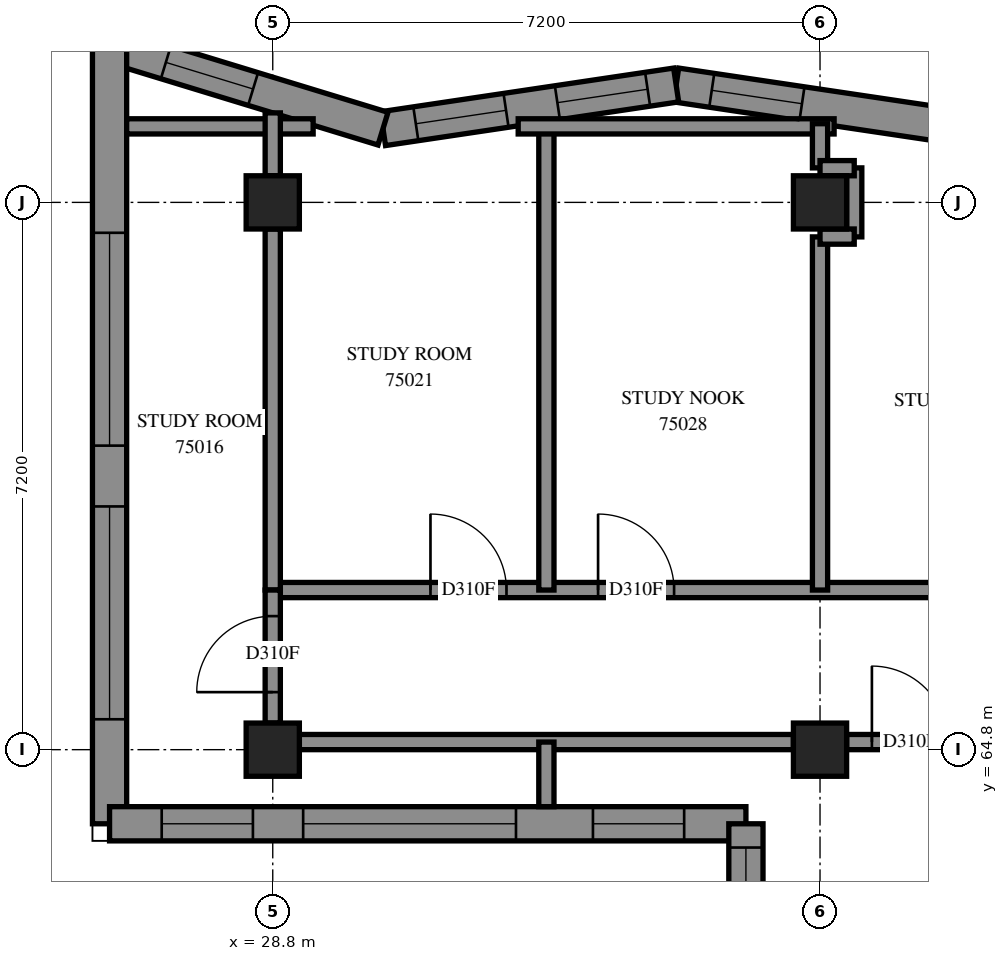
"""IFC4 building model, lengths in metres.
Left out: names, types, materials, properties, quantities, classifications, styles, units other than length and angle.
Written with IfcOpenShell. Run it as: python <this file> out.ifc"""

import sys

from ifc_helpers import new_model, si_unit, direction, frame, frame_2d, origin, origin_2d, place, context, subcontext, project, spatial, polyline, rectangle, outline, extrude, element, fill, save


model = new_model("IFC4")
c1 = context("Model", 3, precision=1e-05, world=origin(), true_north=direction((0.0, 1.0)))
c2 = subcontext(c1, "Body", "Model", "MODEL_VIEW")
j1 = project(units=[si_unit("LENGTHUNIT", "METRE"), si_unit("PLANEANGLEUNIT", "RADIAN")], contexts=[c1])
p1 = place(None, origin())
s1 = spatial("IfcSite", under=j1, at=p1, CompositionType="ELEMENT")
p2 = place(p1, origin())
s2 = spatial("IfcBuilding", under=s1, at=p2, CompositionType="ELEMENT")
p3 = place(p2, frame((0.0, 0.0, 274.4)))
s3 = spatial("IfcBuildingStorey", under=s2, at=p3, CompositionType="ELEMENT", Elevation=274.4)
for number, where, z_axis, x_axis in (
    (1, (28.8, 64.8, 0.0), (0.0, 0.0, 1.0), (1.0, 0.0, 0.0)),
    (2, (28.8, 72.0, 0.0), (0.0, 0.0, 1.0), (1.0, 0.0, 0.0)),
    (3, (36.0, 64.8, 0.0), (0.0, 0.0, 1.0), (1.0, 0.0, 0.0)),
    (4, (36.0, 72.0, 0.0), (0.0, 0.0, 1.0), (1.0, 0.0, 0.0)),
):
    element("IfcColumn", number, at=place(p3, frame(where, z_axis=z_axis, x_axis=x_axis)), inside=s3, PredefinedType="COLUMN", context=c2, shape_type="SweptSolid", body=[
        extrude(rectangle(XDim=0.7, YDim=0.7, at=origin_2d()), origin(), (0.0, 0.0, 1.0), 3.1),
    ])
p4 = place(p3, frame((37.947, 72.972, 0.0), z_axis=(0.0, 0.0, 1.0), x_axis=(-0.9890847468, 0.1473477641, 0.0)))
e5 = element("IfcWall", 5, at=p4, inside=s3, PredefinedType="SOLIDWALL", context=c2, shape_type="SweptSolid", body=[
    extrude(outline(polyline([(0.034, -0.225), (3.916, -0.225), (3.849, 0.225), (-0.034, 0.225), (0.034, -0.225)])), origin(), (0.0, 0.0, 1.0), 3.1),
])
p5 = place(p4, frame((2.208, 0.0, 0.45)))
e6 = element("IfcOpeningElement", 6, at=p5, cuts=e5, PredefinedType="OPENING", context=c2, shape_type="SweptSolid", body=[
    extrude(rectangle(XDim=1.2, YDim=2.55, at=frame_2d((0.6, 1.275))), frame((0.0, 0.235, 0.0), z_axis=(0.0, -1.0, 0.0), x_axis=(1.0, 0.0, 0.0)), (0.0, 0.0, 1.0), 0.47),
])
p6 = place(p3, frame((34.107, 73.544, 0.0), z_axis=(0.0, 0.0, 1.0), x_axis=(-0.9890865204, -0.1473358586, 0.0)))
e7 = element("IfcWall", 7, at=p6, inside=s3, PredefinedType="SOLIDWALL", context=c2, shape_type="SweptSolid", body=[
    extrude(outline(polyline([(-0.034, -0.225), (3.849, -0.225), (3.95, 0.225), (0.034, 0.225), (-0.034, -0.225)])), origin(), (0.0, 0.0, 1.0), 3.1),
])
p7 = place(p6, frame((0.38, 0.0, 0.45)))
e8 = element("IfcOpeningElement", 8, at=p7, cuts=e7, PredefinedType="OPENING", context=c2, shape_type="SweptSolid", body=[
    extrude(rectangle(XDim=1.2, YDim=2.55, at=frame_2d((0.6, 1.275))), frame((0.0, 0.235, 0.0), z_axis=(0.0, -1.0, 0.0), x_axis=(1.0, 0.0, 0.0)), (0.0, 0.0, 1.0), 0.47),
])
p8 = place(p6, frame((2.263, 0.0, 0.45)))
e9 = element("IfcOpeningElement", 9, at=p8, cuts=e7, PredefinedType="OPENING", context=c2, shape_type="SweptSolid", body=[
    extrude(rectangle(XDim=1.2, YDim=2.55, at=frame_2d((0.6, 1.275))), frame((0.0, 0.235, 0.0), z_axis=(0.0, -1.0, 0.0), x_axis=(1.0, 0.0, 0.0)), (0.0, 0.0, 1.0), 0.47),
])
p9 = place(p3, frame((30.25, 72.97, 0.0), z_axis=(0.0, 0.0, 1.0), x_axis=(-0.9564359426, 0.2919422678, 0.0)))
e10 = element("IfcWall", 10, at=p9, inside=s3, PredefinedType="SOLIDWALL", context=c2, shape_type="SweptSolid", body=[
    extrude(outline(polyline([(0.051, -0.225), (4.065, -0.225), (3.457, 0.225), (-0.051, 0.225), (0.051, -0.225)])), origin(), (0.0, 0.0, 1.0), 3.1),
])
p10 = place(p9, frame((1.787, 0.0, 0.45)))
e11 = element("IfcOpeningElement", 11, at=p10, cuts=e10, PredefinedType="OPENING", context=c2, shape_type="SweptSolid", body=[
    extrude(rectangle(XDim=1.2, YDim=2.55, at=frame_2d((0.6, 1.275))), frame((0.0, 0.235, 0.0), z_axis=(0.0, -1.0, 0.0), x_axis=(1.0, 0.0, 0.0)), (0.0, 0.0, 1.0), 0.47),
])
p11 = place(p3, frame((26.653, 74.068, 0.0), z_axis=(0.0, 0.0, 1.0), x_axis=(0.0, -1.0, 0.0)))
e12 = element("IfcWall", 12, at=p11, inside=s3, PredefinedType="SOLIDWALL", context=c2, shape_type="SweptSolid", body=[
    extrude(outline(polyline([(-0.304, -0.225), (10.468, -0.225), (10.018, 0.225), (0.304, 0.225), (-0.304, -0.225)])), origin(), (0.0, 0.0, 1.0), 3.1),
])
p12 = place(p11, frame((2.468, 0.0, 0.45)))
e13 = element("IfcOpeningElement", 13, at=p12, cuts=e12, PredefinedType="OPENING", context=c2, shape_type="SweptSolid", body=[
    extrude(rectangle(XDim=2.8, YDim=2.55, at=frame_2d((1.4, 1.275))), frame((0.0, 0.235, 0.0), z_axis=(0.0, -1.0, 0.0), x_axis=(1.0, 0.0, 0.0)), (0.0, 0.0, 1.0), 0.47),
])
p13 = place(p11, frame((6.068, 0.0, 0.45)))
e14 = element("IfcOpeningElement", 14, at=p13, cuts=e12, PredefinedType="OPENING", context=c2, shape_type="SweptSolid", body=[
    extrude(rectangle(XDim=2.8, YDim=2.55, at=frame_2d((1.4, 1.275))), frame((0.0, 0.235, 0.0), z_axis=(0.0, -1.0, 0.0), x_axis=(1.0, 0.0, 0.0)), (0.0, 0.0, 1.0), 0.47),
])
p14 = place(p3, frame((26.653, 63.825, 0.0), z_axis=(0.0, 0.0, 1.0), x_axis=(1.0, 0.0, 0.0)))
e15 = element("IfcWall", 15, at=p14, inside=s3, PredefinedType="SOLIDWALL", context=c2, shape_type="SweptSolid", body=[
    extrude(outline(polyline([(-0.225, -0.225), (8.147, -0.225), (8.597, 0.225), (0.225, 0.225), (-0.225, -0.225)])), origin(), (0.0, 0.0, 1.0), 3.1),
])
p15 = place(p14, frame((2.547, 0.0, 0.45)))
e16 = element("IfcOpeningElement", 16, at=p15, cuts=e15, PredefinedType="OPENING", context=c2, shape_type="SweptSolid", body=[
    extrude(rectangle(XDim=2.8, YDim=2.55, at=frame_2d((1.4, 1.275))), frame((0.0, 0.235, 0.0), z_axis=(0.0, -1.0, 0.0), x_axis=(1.0, 0.0, 0.0)), (0.0, 0.0, 1.0), 0.47),
])
p16 = place(p14, frame((0.686, 0.0, 0.45)))
e17 = element("IfcOpeningElement", 17, at=p16, cuts=e15, PredefinedType="OPENING", context=c2, shape_type="SweptSolid", body=[
    extrude(rectangle(XDim=1.2, YDim=2.55, at=frame_2d((0.6, 1.275))), frame((0.0, 0.235, 0.0), z_axis=(0.0, -1.0, 0.0), x_axis=(1.0, 0.0, 0.0)), (0.0, 0.0, 1.0), 0.47),
])
p17 = place(p14, frame((6.359, 0.0, 0.45)))
e18 = element("IfcOpeningElement", 18, at=p17, cuts=e15, PredefinedType="OPENING", context=c2, shape_type="SweptSolid", body=[
    extrude(rectangle(XDim=1.2, YDim=2.55, at=frame_2d((0.6, 1.275))), frame((0.0, 0.235, 0.0), z_axis=(0.0, -1.0, 0.0), x_axis=(1.0, 0.0, 0.0)), (0.0, 0.0, 1.0), 0.47),
])
p18 = place(p3, frame((35.025, 63.825, 0.0), z_axis=(0.0, 0.0, 1.0), x_axis=(0.0, -1.0, 0.0)))
e19 = element("IfcWall", 19, at=p18, inside=s3, PredefinedType="SOLIDWALL", context=c2, shape_type="SweptSolid", body=[
    extrude(outline(polyline([(0.225, -0.225), (7.425, -0.225), (6.975, 0.225), (-0.225, 0.225), (0.225, -0.225)])), origin(), (0.0, 0.0, 1.0), 3.1),
])
p19 = place(p18, frame((0.312, 0.0, 0.45)))
e20 = element("IfcOpeningElement", 20, at=p19, cuts=e19, PredefinedType="OPENING", context=c2, shape_type="SweptSolid", body=[
    extrude(rectangle(XDim=1.2, YDim=2.55, at=frame_2d((0.6, 1.275))), frame((0.0, 0.235, 0.0), z_axis=(0.0, -1.0, 0.0), x_axis=(1.0, 0.0, 0.0)), (0.0, 0.0, 1.0), 0.47),
])
p20 = place(p18, frame((3.875, 0.0, 0.7)))
e21 = element("IfcOpeningElement", 21, at=p20, cuts=e19, PredefinedType="OPENING", context=c2, shape_type="SweptSolid", body=[
    extrude(rectangle(XDim=1.8, YDim=2.3, at=frame_2d((0.9, 1.15))), frame((0.0, 0.235, 0.0), z_axis=(0.0, -1.0, 0.0), x_axis=(1.0, 0.0, 0.0)), (0.0, 0.0, 1.0), 0.47),
])
p21 = place(p3, frame((28.8, 66.9, 0.0), z_axis=(0.0, 0.0, 1.0), x_axis=(1.0, 0.0, 0.0)))
e22 = element("IfcWall", 22, at=p21, inside=s3, PredefinedType="PARTITIONING", context=c2, shape_type="SweptSolid", body=[
    extrude(rectangle(XDim=11.8, YDim=0.2, at=frame_2d((5.9, 0.0))), origin(), (0.0, 0.0, 1.0), 3.1),
])
p22 = place(p21, frame((2.075, 0.0, 0.0)))
e23 = element("IfcOpeningElement", 23, at=p22, cuts=e22, PredefinedType="OPENING", context=c2, shape_type="SweptSolid", body=[
    extrude(rectangle(XDim=1.0, YDim=2.1, at=frame_2d((0.5, 1.05))), frame((0.0, 0.11, 0.0), z_axis=(0.0, -1.0, 0.0), x_axis=(1.0, 0.0, 0.0)), (0.0, 0.0, 1.0), 0.22),
])
p23 = place(p21, frame((9.275, 0.0, 0.0)))
e24 = element("IfcOpeningElement", 24, at=p23, cuts=e22, PredefinedType="OPENING", context=c2, shape_type="SweptSolid", body=[
    extrude(rectangle(XDim=1.0, YDim=2.1, at=frame_2d((0.5, 1.05))), frame((0.0, 0.11, 0.0), z_axis=(0.0, -1.0, 0.0), x_axis=(1.0, 0.0, 0.0)), (0.0, 0.0, 1.0), 0.22),
])
p24 = place(p21, frame((4.28, 0.0, 0.0)))
e25 = element("IfcOpeningElement", 25, at=p24, cuts=e22, PredefinedType="OPENING", context=c2, shape_type="SweptSolid", body=[
    extrude(rectangle(XDim=1.0, YDim=2.1, at=frame_2d((0.5, 1.05))), frame((0.0, 0.11, 0.0), z_axis=(0.0, -1.0, 0.0), x_axis=(1.0, 0.0, 0.0)), (0.0, 0.0, 1.0), 0.22),
])
p25 = place(p3, frame((29.15, 64.9, 0.0), z_axis=(0.0, 0.0, 1.0), x_axis=(1.0, 0.0, 0.0)))
e26 = element("IfcWall", 26, at=p25, inside=s3, PredefinedType="PARTITIONING", context=c2, shape_type="SweptSolid", body=[
    extrude(rectangle(XDim=6.5, YDim=0.2, at=frame_2d((3.25, 0.0))), origin(), (0.0, 0.0, 1.0), 2.6),
])
p26 = place(p3, frame((32.4, 66.9, 0.0), z_axis=(0.0, 0.0, 1.0), x_axis=(0.0, 1.0, 0.0)))
e27 = element("IfcWall", 27, at=p26, inside=s3, PredefinedType="PARTITIONING", context=c2, shape_type="SweptSolid", body=[
    extrude(rectangle(XDim=6.163, YDim=0.2, at=frame_2d((3.081, 0.0))), origin(), (0.0, 0.0, 1.0), 3.1),
])
p27 = place(p3, frame((28.8, 66.9, 0.0), z_axis=(0.0, 0.0, 1.0), x_axis=(0.0, 1.0, 0.0)))
e28 = element("IfcWall", 28, at=p27, inside=s3, PredefinedType="PARTITIONING", context=c2, shape_type="SweptSolid", body=[
    extrude(rectangle(XDim=4.75, YDim=0.2, at=frame_2d((2.375, 0.0))), origin(), (0.0, 0.0, 1.0), 2.6),
])
p28 = place(p3, frame((36.0, 66.9, 0.0), z_axis=(0.0, 0.0, 1.0), x_axis=(0.0, 1.0, 0.0)))
e29 = element("IfcWall", 29, at=p28, inside=s3, PredefinedType="PARTITIONING", context=c2, shape_type="SweptSolid", body=[
    extrude(rectangle(XDim=4.646, YDim=0.2, at=frame_2d((2.323, 0.0))), origin(), (0.0, 0.0, 1.0), 3.1),
])
p29 = place(p3, frame((32.029, 73.0, 0.0), z_axis=(0.0, 0.0, 1.0), x_axis=(1.0, 0.0, 0.0)))
e30 = element("IfcWall", 30, at=p29, inside=s3, PredefinedType="PARTITIONING", context=c2, shape_type="SweptSolid", body=[
    extrude(rectangle(XDim=4.156, YDim=0.2, at=frame_2d((2.078, 0.0))), origin(), (0.0, 0.0, 1.0), 3.1),
])
p30 = place(p3, frame((26.878, 73.0, 0.0), z_axis=(0.0, 0.0, 1.0), x_axis=(1.0, 0.0, 0.0)))
e31 = element("IfcWall", 31, at=p30, inside=s3, PredefinedType="PARTITIONING", context=c2, shape_type="SweptSolid", body=[
    extrude(rectangle(XDim=2.453, YDim=0.2, at=frame_2d((1.227, 0.0))), origin(), (0.0, 0.0, 1.0), 3.1),
])
p31 = place(p3, frame((36.35, 64.9, 0.0), z_axis=(0.0, 0.0, 1.0), x_axis=(1.0, 0.0, 0.0)))
e32 = element("IfcWall", 32, at=p31, inside=s3, PredefinedType="PARTITIONING", context=c2, shape_type="SweptSolid", body=[
    extrude(rectangle(XDim=2.25, YDim=0.2, at=frame_2d((1.125, 0.0))), origin(), (0.0, 0.0, 1.0), 3.1),
])
p32 = place(p31, frame((0.333, 0.0, 0.0)))
e33 = element("IfcOpeningElement", 33, at=p32, cuts=e32, PredefinedType="OPENING", context=c2, shape_type="SweptSolid", body=[
    extrude(rectangle(XDim=1.0, YDim=2.1, at=frame_2d((0.5, 1.05))), frame((0.0, 0.11, 0.0), z_axis=(0.0, -1.0, 0.0), x_axis=(1.0, 0.0, 0.0)), (0.0, 0.0, 1.0), 0.22),
])
p33 = place(p3, frame((28.8, 65.15, 0.0), z_axis=(0.0, 0.0, 1.0), x_axis=(0.0, 1.0, 0.0)))
e34 = element("IfcWall", 34, at=p33, inside=s3, PredefinedType="PARTITIONING", context=c2, shape_type="SweptSolid", body=[
    extrude(rectangle(XDim=1.75, YDim=0.2, at=frame_2d((0.875, 0.0))), origin(), (0.0, 0.0, 1.0), 2.6),
])
p34 = place(p33, frame((0.407, 0.0, 0.0)))
e35 = element("IfcOpeningElement", 35, at=p34, cuts=e34, PredefinedType="OPENING", context=c2, shape_type="SweptSolid", body=[
    extrude(rectangle(XDim=1.0, YDim=2.1, at=frame_2d((0.5, 1.05))), frame((0.0, 0.11, 0.0), z_axis=(0.0, -1.0, 0.0), x_axis=(1.0, 0.0, 0.0)), (0.0, 0.0, 1.0), 0.22),
])
p35 = place(p3, frame((36.45, 71.546, 0.0), z_axis=(0.0, 0.0, 1.0), x_axis=(0.0, 1.0, 0.0)))
e36 = element("IfcWall", 36, at=p35, inside=s3, PredefinedType="PARTITIONING", context=c2, shape_type="SweptSolid", body=[
    extrude(rectangle(XDim=0.908, YDim=0.2, at=frame_2d((0.454, 0.0))), origin(), (0.0, 0.0, 1.0), 3.1),
])
p36 = place(p3, frame((32.4, 64.05, 0.0), z_axis=(0.0, 0.0, 1.0), x_axis=(0.0, 1.0, 0.0)))
e37 = element("IfcWall", 37, at=p36, inside=s3, PredefinedType="PARTITIONING", context=c2, shape_type="SweptSolid", body=[
    extrude(rectangle(XDim=0.85, YDim=0.2, at=frame_2d((0.425, 0.0))), origin(), (0.0, 0.0, 1.0), 3.1),
])
p37 = place(p3, frame((28.8, 72.35, 0.0), z_axis=(0.0, 0.0, 1.0), x_axis=(0.0, 1.0, 0.0)))
e38 = element("IfcWall", 38, at=p37, inside=s3, PredefinedType="PARTITIONING", context=c2, shape_type="SweptSolid", body=[
    extrude(rectangle(XDim=0.828, YDim=0.2, at=frame_2d((0.414, 0.0))), origin(), (0.0, 0.0, 1.0), 3.1),
])
p38 = place(p3, frame((36.0, 72.454, 0.0), z_axis=(0.0, 0.0, 1.0), x_axis=(0.0, 1.0, 0.0)))
e39 = element("IfcWall", 39, at=p38, inside=s3, PredefinedType="PARTITIONING", context=c2, shape_type="SweptSolid", body=[
    extrude(rectangle(XDim=0.581, YDim=0.2, at=frame_2d((0.29, 0.0))), origin(), (0.0, 0.0, 1.0), 3.1),
])
for number, where, z_axis, x_axis in (
    (40, (36.0, 71.55, 0.0), (0.0, 0.0, 1.0), (1.0, 0.0, 0.0)),
    (41, (36.0, 72.45, 0.0), (0.0, 0.0, 1.0), (1.0, 0.0, 0.0)),
):
    element("IfcWall", number, at=place(p3, frame(where, z_axis=z_axis, x_axis=x_axis)), inside=s3, PredefinedType="PARTITIONING", context=c2, shape_type="SweptSolid", body=[
        extrude(rectangle(XDim=0.45, YDim=0.2, at=frame_2d((0.225, 0.0))), origin(), (0.0, 0.0, 1.0), 3.1),
    ])
p39 = place(p5, origin())
e42 = element("IfcWindow", 42, at=p39, inside=s3, PartitioningType="SINGLE_PANEL", PredefinedType="WINDOW", context=c2, shape_type="SweptSolid", body=[
    extrude(rectangle(XDim=1.2, YDim=2.55, at=frame_2d((0.6, 1.275))), frame((0.0, 0.165, 0.0), z_axis=(0.0, -1.0, 0.0), x_axis=(1.0, 0.0, 0.0)), (0.0, 0.0, 1.0), 0.06),
])
fill(e6, e42)
p40 = place(p7, origin())
e43 = element("IfcWindow", 43, at=p40, inside=s3, PartitioningType="SINGLE_PANEL", PredefinedType="WINDOW", context=c2, shape_type="SweptSolid", body=[
    extrude(rectangle(XDim=1.2, YDim=2.55, at=frame_2d((0.6, 1.275))), frame((0.0, 0.175, 0.0), z_axis=(0.0, -1.0, 0.0), x_axis=(1.0, 0.0, 0.0)), (0.0, 0.0, 1.0), 0.06),
])
fill(e8, e43)
p41 = place(p8, origin())
e44 = element("IfcWindow", 44, at=p41, inside=s3, PartitioningType="SINGLE_PANEL", PredefinedType="WINDOW", context=c2, shape_type="SweptSolid", body=[
    extrude(rectangle(XDim=1.2, YDim=2.55, at=frame_2d((0.6, 1.275))), frame((0.0, 0.205, 0.0), z_axis=(0.0, -1.0, 0.0), x_axis=(1.0, 0.0, 0.0)), (0.0, 0.0, 1.0), 0.06),
])
fill(e9, e44)
p42 = place(p10, origin())
e45 = element("IfcWindow", 45, at=p42, inside=s3, PartitioningType="SINGLE_PANEL", PredefinedType="WINDOW", context=c2, shape_type="SweptSolid", body=[
    extrude(rectangle(XDim=1.2, YDim=2.55, at=frame_2d((0.6, 1.275))), frame((0.0, 0.205, 0.0), z_axis=(0.0, -1.0, 0.0), x_axis=(1.0, 0.0, 0.0)), (0.0, 0.0, 1.0), 0.06),
])
fill(e11, e45)
p43 = place(p12, origin())
e46 = element("IfcWindow", 46, at=p43, inside=s3, PartitioningType="SINGLE_PANEL", PredefinedType="WINDOW", context=c2, shape_type="SweptSolid", body=[
    extrude(rectangle(XDim=2.8, YDim=2.55, at=frame_2d((1.4, 1.275))), frame((0.0, 0.205, 0.0), z_axis=(0.0, -1.0, 0.0), x_axis=(1.0, 0.0, 0.0)), (0.0, 0.0, 1.0), 0.06),
])
fill(e13, e46)
p44 = place(p13, origin())
e47 = element("IfcWindow", 47, at=p44, inside=s3, PartitioningType="SINGLE_PANEL", PredefinedType="WINDOW", context=c2, shape_type="SweptSolid", body=[
    extrude(rectangle(XDim=2.8, YDim=2.55, at=frame_2d((1.4, 1.275))), frame((0.0, 0.205, 0.0), z_axis=(0.0, -1.0, 0.0), x_axis=(1.0, 0.0, 0.0)), (0.0, 0.0, 1.0), 0.06),
])
fill(e14, e47)
p45 = place(p15, origin())
e48 = element("IfcWindow", 48, at=p45, inside=s3, PartitioningType="SINGLE_PANEL", PredefinedType="WINDOW", context=c2, shape_type="SweptSolid", body=[
    extrude(rectangle(XDim=2.8, YDim=2.55, at=frame_2d((1.4, 1.275))), frame((0.0, 0.205, 0.0), z_axis=(0.0, -1.0, 0.0), x_axis=(1.0, 0.0, 0.0)), (0.0, 0.0, 1.0), 0.06),
])
fill(e16, e48)
p46 = place(p16, origin())
e49 = element("IfcWindow", 49, at=p46, inside=s3, PartitioningType="SINGLE_PANEL", PredefinedType="WINDOW", context=c2, shape_type="SweptSolid", body=[
    extrude(rectangle(XDim=1.2, YDim=2.55, at=frame_2d((0.6, 1.275))), frame((0.0, 0.205, 0.0), z_axis=(0.0, -1.0, 0.0), x_axis=(1.0, 0.0, 0.0)), (0.0, 0.0, 1.0), 0.06),
])
fill(e17, e49)
p47 = place(p17, origin())
e50 = element("IfcWindow", 50, at=p47, inside=s3, PartitioningType="SINGLE_PANEL", PredefinedType="WINDOW", context=c2, shape_type="SweptSolid", body=[
    extrude(rectangle(XDim=1.2, YDim=2.55, at=frame_2d((0.6, 1.275))), frame((0.0, 0.205, 0.0), z_axis=(0.0, -1.0, 0.0), x_axis=(1.0, 0.0, 0.0)), (0.0, 0.0, 1.0), 0.06),
])
fill(e18, e50)
p48 = place(p19, origin())
e51 = element("IfcWindow", 51, at=p48, inside=s3, PartitioningType="SINGLE_PANEL", PredefinedType="WINDOW", context=c2, shape_type="SweptSolid", body=[
    extrude(rectangle(XDim=1.2, YDim=2.55, at=frame_2d((0.6, 1.275))), frame((0.0, 0.205, 0.0), z_axis=(0.0, -1.0, 0.0), x_axis=(1.0, 0.0, 0.0)), (0.0, 0.0, 1.0), 0.06),
])
fill(e20, e51)
p49 = place(p34, origin())
e52 = element("IfcDoor", 52, at=p49, inside=s3, OperationType="SINGLE_SWING_LEFT", PredefinedType="DOOR", context=c2, shape_type="SweptSolid", body=[
    extrude(rectangle(XDim=1.0, YDim=2.1, at=frame_2d((0.5, 1.05))), frame((0.0, 0.025, 0.0), z_axis=(0.0, -1.0, 0.0), x_axis=(1.0, 0.0, 0.0)), (0.0, 0.0, 1.0), 0.05),
])
fill(e35, e52)
p50 = place(p22, origin())
e53 = element("IfcDoor", 53, at=p50, inside=s3, OperationType="SINGLE_SWING_RIGHT", PredefinedType="DOOR", context=c2, shape_type="SweptSolid", body=[
    extrude(rectangle(XDim=1.0, YDim=2.1, at=frame_2d((0.5, 1.05))), frame((0.0, 0.025, 0.0), z_axis=(0.0, -1.0, 0.0), x_axis=(1.0, 0.0, 0.0)), (0.0, 0.0, 1.0), 0.05),
])
fill(e23, e53)
p51 = place(p32, origin())
e54 = element("IfcDoor", 54, at=p51, inside=s3, OperationType="SINGLE_SWING_RIGHT", PredefinedType="DOOR", context=c2, shape_type="SweptSolid", body=[
    extrude(rectangle(XDim=1.0, YDim=2.1, at=frame_2d((0.5, 1.05))), frame((0.0, 0.025, 0.0), z_axis=(0.0, -1.0, 0.0), x_axis=(1.0, 0.0, 0.0)), (0.0, 0.0, 1.0), 0.05),
])
fill(e33, e54)
p52 = place(p24, origin())
e55 = element("IfcDoor", 55, at=p52, inside=s3, OperationType="SINGLE_SWING_LEFT", PredefinedType="DOOR", context=c2, shape_type="SweptSolid", body=[
    extrude(rectangle(XDim=1.0, YDim=2.1, at=frame_2d((0.5, 1.05))), frame((0.0, 0.025, 0.0), z_axis=(0.0, -1.0, 0.0), x_axis=(1.0, 0.0, 0.0)), (0.0, 0.0, 1.0), 0.05),
])
fill(e25, e55)
save(model, sys.argv[1])
